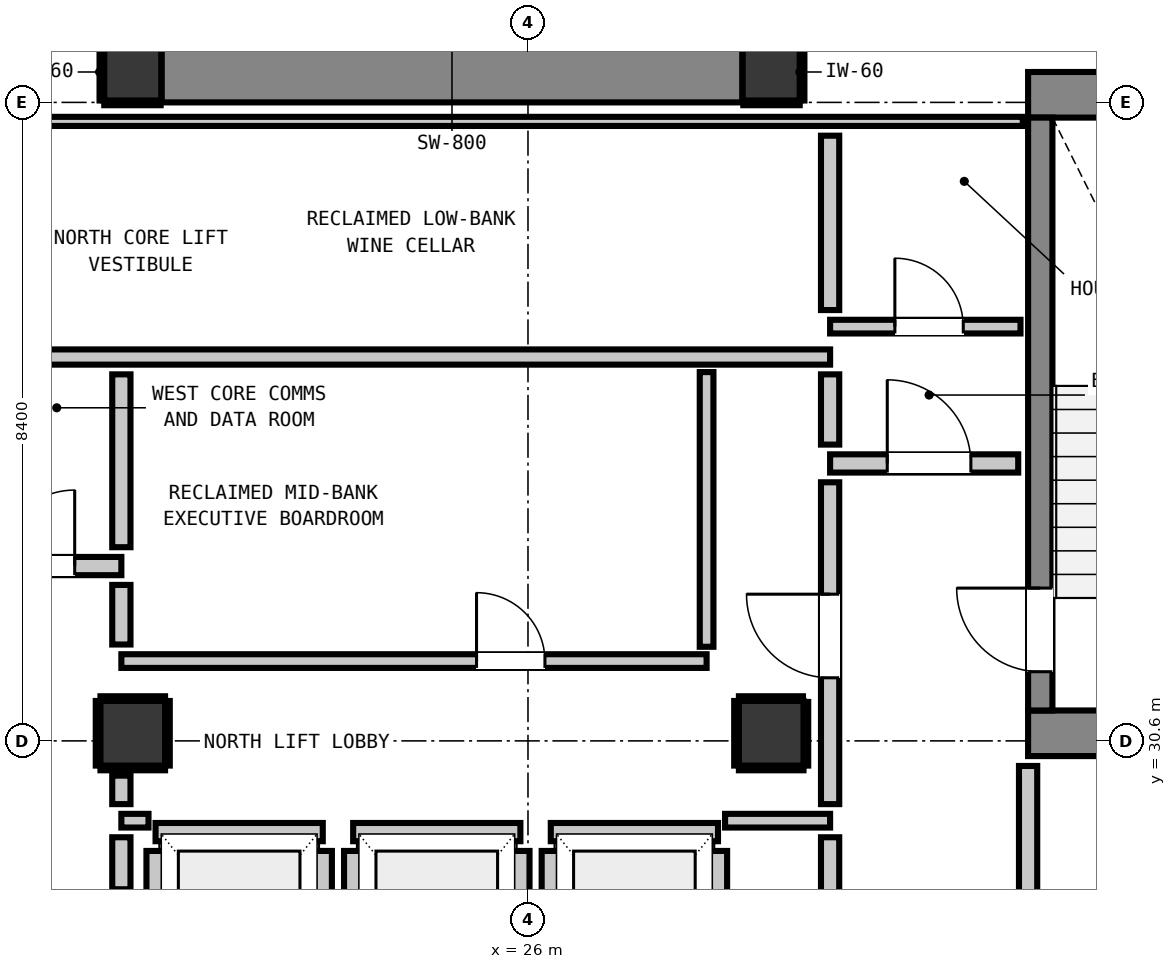
"""IFC4 building model, lengths in metres.
Left out: names, types, materials, properties, quantities, classifications, styles, units other than length and angle.
Written with IfcOpenShell. Run it as: python <this file> out.ifc"""

import sys

from ifc_helpers import new_model, si_unit, direction, frame, frame_2d, origin, origin_2d, place, context, subcontext, project, spatial, rectangle, extrude, element, fill, save


model = new_model("IFC4")
c1 = context("Model", 3, precision=1e-05, world=origin(), true_north=direction((0.0, 1.0)))
c2 = subcontext(c1, "Body", "Model", "MODEL_VIEW")
j1 = project(units=[si_unit("LENGTHUNIT", "METRE"), si_unit("PLANEANGLEUNIT", "RADIAN")], contexts=[c1])
p1 = place(None, origin())
s1 = spatial("IfcSite", under=j1, at=p1, CompositionType="ELEMENT")
p2 = place(p1, origin())
s2 = spatial("IfcBuilding", under=s1, at=p2, CompositionType="ELEMENT")
p3 = place(p2, frame((0.0, 0.0, 247.88)))
s3 = spatial("IfcBuildingStorey", under=s2, at=p3, CompositionType="ELEMENT", Elevation=247.88)
for number, where, z_axis, x_axis in (
    (1, (20.8, 39.4, 0.0), (0.0, 0.0, 1.0), (1.0, 0.0, 0.0)),
    (2, (29.2, 39.4, 0.0), (0.0, 0.0, 1.0), (1.0, 0.0, 0.0)),
):
    element("IfcColumn", number, at=place(p3, frame(where, z_axis=z_axis, x_axis=x_axis)), inside=s3, PredefinedType="COLUMN", context=c2, shape_type="SweptSolid", body=[
        extrude(rectangle(XDim=0.75, YDim=0.75, at=origin_2d()), origin(), (0.0, 0.0, 1.0), 3.32),
    ])
p4 = place(p3, frame((32.58, 39.1, 0.0), z_axis=(0.0, 0.0, 1.0), x_axis=(1.0, 0.0, 0.0)))
e3 = element("IfcWall", 3, at=p4, inside=s3, PredefinedType="SHEAR", context=c2, shape_type="SweptSolid", body=[
    extrude(rectangle(XDim=4.08, YDim=0.6, at=frame_2d((2.04, 0.0))), origin(), (0.0, 0.0, 1.0), 3.32),
])
p5 = place(p3, frame((32.58, 30.7, 0.0), z_axis=(0.0, 0.0, 1.0), x_axis=(1.0, 0.0, 0.0)))
e4 = element("IfcWall", 4, at=p5, inside=s3, PredefinedType="SHEAR", context=c2, shape_type="SweptSolid", body=[
    extrude(rectangle(XDim=3.54, YDim=0.6, at=frame_2d((1.77, 0.0))), origin(), (0.0, 0.0, 1.0), 3.32),
])
p6 = place(p3, frame((21.18, 39.4, 0.0), z_axis=(0.0, 0.0, 1.0), x_axis=(1.0, 0.0, 0.0)))
e5 = element("IfcWall", 5, at=p6, inside=s3, PredefinedType="SHEAR", context=c2, shape_type="SweptSolid", body=[
    extrude(rectangle(XDim=7.64, YDim=0.8, at=frame_2d((3.82, 0.0))), origin(), (0.0, 0.0, 1.0), 3.32),
])
p7 = place(p3, frame((32.74, 31.0, 0.0), z_axis=(0.0, 0.0, 1.0), x_axis=(0.0, 1.0, 0.0)))
e6 = element("IfcWall", 6, at=p7, inside=s3, PredefinedType="SHEAR", context=c2, shape_type="SweptSolid", body=[
    extrude(rectangle(XDim=7.8, YDim=0.32, at=frame_2d((3.9, 0.0))), origin(), (0.0, 0.0, 1.0), 3.32),
])
p8 = place(p7, frame((0.51, 0.0, 0.0)))
e7 = element("IfcOpeningElement", 7, at=p8, cuts=e6, PredefinedType="OPENING", context=c2, shape_type="SweptSolid", body=[
    extrude(rectangle(XDim=1.1, YDim=2.15, at=frame_2d((0.55, 1.075))), frame((0.0, 0.17, 0.0), z_axis=(0.0, -1.0, 0.0), x_axis=(1.0, 0.0, 0.0)), (0.0, 0.0, 1.0), 0.34),
])
for number, where, z_axis, x_axis in (
    (8, (20.8, 30.7, 0.0), (0.0, 0.0, 1.0), (1.0, 0.0, 0.0)),
    (9, (29.2, 30.7, 0.0), (0.0, 0.0, 1.0), (1.0, 0.0, 0.0)),
):
    element("IfcColumn", number, at=place(p3, frame(where, z_axis=z_axis, x_axis=x_axis)), inside=s3, PredefinedType="COLUMN", context=c2, shape_type="SweptSolid", body=[
        extrude(rectangle(XDim=0.85, YDim=0.85, at=origin_2d()), origin(), (0.0, 0.0, 1.0), 3.32),
    ])
p9 = place(p3, frame((21.1, 29.4, 0.0), z_axis=(0.0, 0.0, 1.0), x_axis=(1.0, 0.0, 0.0)))
e10 = element("IfcWall", 10, at=p9, inside=s3, PredefinedType="PARTITIONING", context=c2, shape_type="SweptSolid", body=[
    extrude(rectangle(XDim=2.2, YDim=0.24, at=frame_2d((1.1, 0.0))), origin(), (0.0, 0.0, 1.0), 2.9),
])
p10 = place(p3, frame((21.1, 27.048, 0.0), z_axis=(0.0, 0.0, 1.0), x_axis=(0.0, 1.0, 0.0)))
e11 = element("IfcWall", 11, at=p10, inside=s3, PredefinedType="PARTITIONING", context=c2, shape_type="SweptSolid", body=[
    extrude(rectangle(XDim=2.104, YDim=0.24, at=frame_2d((1.052, 0.0))), origin(), (0.0, 0.0, 1.0), 0.905),
])
p11 = place(p3, frame((23.3, 27.048, 0.0), z_axis=(0.0, 0.0, 1.0), x_axis=(0.0, 1.0, 0.0)))
e12 = element("IfcWall", 12, at=p11, inside=s3, PredefinedType="PARTITIONING", context=c2, shape_type="SweptSolid", body=[
    extrude(rectangle(XDim=2.104, YDim=0.24, at=frame_2d((1.052, 0.0))), origin(), (0.0, 0.0, 1.0), 2.9),
])
p12 = place(p3, frame((23.7, 29.4, 0.0), z_axis=(0.0, 0.0, 1.0), x_axis=(1.0, 0.0, 0.0)))
e13 = element("IfcWall", 13, at=p12, inside=s3, PredefinedType="PARTITIONING", context=c2, shape_type="SweptSolid", body=[
    extrude(rectangle(XDim=2.2, YDim=0.24, at=frame_2d((1.1, 0.0))), origin(), (0.0, 0.0, 1.0), 2.9),
])
for number, where, z_axis, x_axis in (
    (14, (23.7, 27.048, 0.0), (0.0, 0.0, 1.0), (0.0, 1.0, 0.0)),
    (15, (25.9, 27.048, 0.0), (0.0, 0.0, 1.0), (0.0, 1.0, 0.0)),
):
    element("IfcWall", number, at=place(p3, frame(where, z_axis=z_axis, x_axis=x_axis)), inside=s3, PredefinedType="PARTITIONING", context=c2, shape_type="SweptSolid", body=[
        extrude(rectangle(XDim=2.104, YDim=0.24, at=frame_2d((1.052, 0.0))), origin(), (0.0, 0.0, 1.0), 2.9),
    ])
p13 = place(p3, frame((26.3, 29.4, 0.0), z_axis=(0.0, 0.0, 1.0), x_axis=(1.0, 0.0, 0.0)))
e16 = element("IfcWall", 16, at=p13, inside=s3, PredefinedType="PARTITIONING", context=c2, shape_type="SweptSolid", body=[
    extrude(rectangle(XDim=2.2, YDim=0.24, at=frame_2d((1.1, 0.0))), origin(), (0.0, 0.0, 1.0), 2.9),
])
p14 = place(p3, frame((26.3, 27.048, 0.0), z_axis=(0.0, 0.0, 1.0), x_axis=(0.0, 1.0, 0.0)))
e17 = element("IfcWall", 17, at=p14, inside=s3, PredefinedType="PARTITIONING", context=c2, shape_type="SweptSolid", body=[
    extrude(rectangle(XDim=2.104, YDim=0.24, at=frame_2d((1.052, 0.0))), origin(), (0.0, 0.0, 1.0), 2.9),
])
p15 = place(p3, frame((28.5, 27.33, 0.0), z_axis=(0.0, 0.0, 1.0), x_axis=(0.0, 1.0, 0.0)))
e18 = element("IfcWall", 18, at=p15, inside=s3, PredefinedType="PARTITIONING", context=c2, shape_type="SweptSolid", body=[
    extrude(rectangle(XDim=1.822, YDim=0.24, at=frame_2d((0.911, 0.0))), origin(), (0.0, 0.0, 1.0), 0.905),
])
p16 = place(p3, frame((17.45, 32.9, 0.0), z_axis=(0.0, 0.0, 1.0), x_axis=(1.0, 0.0, 0.0)))
e19 = element("IfcWall", 19, at=p16, inside=s3, PredefinedType="PARTITIONING", context=c2, shape_type="SweptSolid", body=[
    extrude(rectangle(XDim=3.2, YDim=0.24, at=frame_2d((1.6, 0.0))), origin(), (0.0, 0.0, 1.0), 2.9),
])
p17 = place(p16, frame((0.159, 0.0, 0.0)))
e20 = element("IfcOpeningElement", 20, at=p17, cuts=e19, PredefinedType="OPENING", context=c2, shape_type="SweptSolid", body=[
    extrude(rectangle(XDim=1.1, YDim=2.15, at=frame_2d((0.55, 1.075))), frame((0.0, 0.13, 0.0), z_axis=(0.0, -1.0, 0.0), x_axis=(1.0, 0.0, 0.0)), (0.0, 0.0, 1.0), 0.26),
])
p18 = place(p16, frame((1.586, 0.0, 0.0)))
e21 = element("IfcOpeningElement", 21, at=p18, cuts=e19, PredefinedType="OPENING", context=c2, shape_type="SweptSolid", body=[
    extrude(rectangle(XDim=1.0, YDim=2.15, at=frame_2d((0.5, 1.075))), frame((0.0, 0.13, 0.0), z_axis=(0.0, -1.0, 0.0), x_axis=(1.0, 0.0, 0.0)), (0.0, 0.0, 1.0), 0.26),
])
p19 = place(p3, frame((29.975, 34.25, 0.0), z_axis=(0.0, 0.0, 1.0), x_axis=(1.0, 0.0, 0.0)))
e22 = element("IfcWall", 22, at=p19, inside=s3, PredefinedType="PARTITIONING", context=c2, shape_type="SweptSolid", body=[
    extrude(rectangle(XDim=2.475, YDim=0.24, at=frame_2d((1.237, 0.0))), origin(), (0.0, 0.0, 1.0), 2.9),
])
p20 = place(p19, frame((0.752, 0.0, 0.0)))
e23 = element("IfcOpeningElement", 23, at=p20, cuts=e22, PredefinedType="OPENING", context=c2, shape_type="SweptSolid", body=[
    extrude(rectangle(XDim=1.1, YDim=2.15, at=frame_2d((0.55, 1.075))), frame((0.0, 0.13, 0.0), z_axis=(0.0, -1.0, 0.0), x_axis=(1.0, 0.0, 0.0)), (0.0, 0.0, 1.0), 0.26),
])
p21 = place(p3, frame((18.95, 35.65, 0.0), z_axis=(0.0, 0.0, 1.0), x_axis=(1.0, 0.0, 0.0)))
e24 = element("IfcWall", 24, at=p21, inside=s3, PredefinedType="PARTITIONING", context=c2, shape_type="SweptSolid", body=[
    extrude(rectangle(XDim=11.025, YDim=0.2, at=frame_2d((5.513, 0.0))), origin(), (0.0, 0.0, 1.0), 2.9),
])
p22 = place(p3, frame((20.65, 29.55, 0.0), z_axis=(0.0, 0.0, 1.0), x_axis=(1.0, 0.0, 0.0)))
e25 = element("IfcWall", 25, at=p22, inside=s3, PredefinedType="PARTITIONING", context=c2, shape_type="SweptSolid", body=[
    extrude(rectangle(XDim=0.357, YDim=0.18, at=frame_2d((0.179, 0.0))), origin(), (0.0, 0.0, 1.0), 2.9),
])
p23 = place(p3, frame((28.593, 29.55, 0.0), z_axis=(0.0, 0.0, 1.0), x_axis=(1.0, 0.0, 0.0)))
e26 = element("IfcWall", 26, at=p23, inside=s3, PredefinedType="PARTITIONING", context=c2, shape_type="SweptSolid", body=[
    extrude(rectangle(XDim=1.382, YDim=0.18, at=frame_2d((0.691, 0.0))), origin(), (0.0, 0.0, 1.0), 2.9),
])
p24 = place(p3, frame((20.65, 31.65, 0.0), z_axis=(0.0, 0.0, 1.0), x_axis=(1.0, 0.0, 0.0)))
e27 = element("IfcWall", 27, at=p24, inside=s3, PredefinedType="PARTITIONING", context=c2, shape_type="SweptSolid", body=[
    extrude(rectangle(XDim=7.7, YDim=0.18, at=frame_2d((3.85, 0.0))), origin(), (0.0, 0.0, 1.0), 2.9),
])
p25 = place(p24, frame((4.673, 0.0, 0.0)))
e28 = element("IfcOpeningElement", 28, at=p25, cuts=e27, PredefinedType="OPENING", context=c2, shape_type="SweptSolid", body=[
    extrude(rectangle(XDim=0.9, YDim=2.1, at=frame_2d((0.45, 1.05))), frame((0.0, 0.1, 0.0), z_axis=(0.0, -1.0, 0.0), x_axis=(1.0, 0.0, 0.0)), (0.0, 0.0, 1.0), 0.2),
])
p26 = place(p3, frame((29.975, 36.05, 0.0), z_axis=(0.0, 0.0, 1.0), x_axis=(1.0, 0.0, 0.0)))
e29 = element("IfcWall", 29, at=p26, inside=s3, PredefinedType="PARTITIONING", context=c2, shape_type="SweptSolid", body=[
    extrude(rectangle(XDim=2.505, YDim=0.18, at=frame_2d((1.252, 0.0))), origin(), (0.0, 0.0, 1.0), 2.9),
])
p27 = place(p26, frame((0.852, 0.0, 0.0)))
e30 = element("IfcOpeningElement", 30, at=p27, cuts=e29, PredefinedType="OPENING", context=c2, shape_type="SweptSolid", body=[
    extrude(rectangle(XDim=0.9, YDim=2.1, at=frame_2d((0.45, 1.05))), frame((0.0, 0.1, 0.0), z_axis=(0.0, -1.0, 0.0), x_axis=(1.0, 0.0, 0.0)), (0.0, 0.0, 1.0), 0.2),
])
p28 = place(p3, frame((18.95, 38.75, 0.0), z_axis=(0.0, 0.0, 1.0), x_axis=(1.0, 0.0, 0.0)))
e31 = element("IfcWall", 31, at=p28, inside=s3, PredefinedType="PARTITIONING", context=c2, shape_type="SweptSolid", body=[
    extrude(rectangle(XDim=13.56, YDim=0.12, at=frame_2d((6.78, 0.0))), origin(), (0.0, 0.0, 1.0), 0.905),
])
p29 = place(p3, frame((20.65, 28.648, 0.0), z_axis=(0.0, 0.0, 1.0), x_axis=(0.0, 1.0, 0.0)))
e32 = element("IfcWall", 32, at=p29, inside=s3, PredefinedType="PARTITIONING", context=c2, shape_type="SweptSolid", body=[
    extrude(rectangle(XDim=0.684, YDim=0.24, at=frame_2d((0.342, 0.0))), origin(), (0.0, 0.0, 1.0), 0.905),
])
p30 = place(p3, frame((20.65, 29.768, 0.0), z_axis=(0.0, 0.0, 1.0), x_axis=(0.0, 1.0, 0.0)))
e33 = element("IfcWall", 33, at=p30, inside=s3, PredefinedType="PARTITIONING", context=c2, shape_type="SweptSolid", body=[
    extrude(rectangle(XDim=0.375, YDim=0.24, at=frame_2d((0.188, 0.0))), origin(), (0.0, 0.0, 1.0), 0.905),
])
p31 = place(p3, frame((20.65, 31.868, 0.0), z_axis=(0.0, 0.0, 1.0), x_axis=(0.0, 1.0, 0.0)))
e34 = element("IfcWall", 34, at=p31, inside=s3, PredefinedType="PARTITIONING", context=c2, shape_type="SweptSolid", body=[
    extrude(rectangle(XDim=0.784, YDim=0.24, at=frame_2d((0.392, 0.0))), origin(), (0.0, 0.0, 1.0), 0.905),
])
p32 = place(p3, frame((20.65, 33.148, 0.0), z_axis=(0.0, 0.0, 1.0), x_axis=(0.0, 1.0, 0.0)))
e35 = element("IfcWall", 35, at=p32, inside=s3, PredefinedType="PARTITIONING", context=c2, shape_type="SweptSolid", body=[
    extrude(rectangle(XDim=2.274, YDim=0.24, at=frame_2d((1.137, 0.0))), origin(), (0.0, 0.0, 1.0), 0.905),
])
p33 = place(p3, frame((29.975, 25.648, 0.0), z_axis=(0.0, 0.0, 1.0), x_axis=(0.0, 1.0, 0.0)))
e36 = element("IfcWall", 36, at=p33, inside=s3, PredefinedType="PARTITIONING", context=c2, shape_type="SweptSolid", body=[
    extrude(rectangle(XDim=3.684, YDim=0.24, at=frame_2d((1.842, 0.0))), origin(), (0.0, 0.0, 1.0), 2.9),
])
p34 = place(p3, frame((29.975, 29.768, 0.0), z_axis=(0.0, 0.0, 1.0), x_axis=(0.0, 1.0, 0.0)))
e37 = element("IfcWall", 37, at=p34, inside=s3, PredefinedType="PARTITIONING", context=c2, shape_type="SweptSolid", body=[
    extrude(rectangle(XDim=4.234, YDim=0.24, at=frame_2d((2.117, 0.0))), origin(), (0.0, 0.0, 1.0), 2.9),
])
p35 = place(p34, frame((1.662, 0.0, 0.0)))
e38 = element("IfcOpeningElement", 38, at=p35, cuts=e37, PredefinedType="OPENING", context=c2, shape_type="SweptSolid", body=[
    extrude(rectangle(XDim=1.1, YDim=2.15, at=frame_2d((0.55, 1.075))), frame((0.0, 0.13, 0.0), z_axis=(0.0, -1.0, 0.0), x_axis=(1.0, 0.0, 0.0)), (0.0, 0.0, 1.0), 0.26),
])
p36 = place(p3, frame((29.975, 34.498, 0.0), z_axis=(0.0, 0.0, 1.0), x_axis=(0.0, 1.0, 0.0)))
e39 = element("IfcWall", 39, at=p36, inside=s3, PredefinedType="PARTITIONING", context=c2, shape_type="SweptSolid", body=[
    extrude(rectangle(XDim=0.924, YDim=0.24, at=frame_2d((0.462, 0.0))), origin(), (0.0, 0.0, 1.0), 2.9),
])
p37 = place(p3, frame((29.975, 36.268, 0.0), z_axis=(0.0, 0.0, 1.0), x_axis=(0.0, 1.0, 0.0)))
e40 = element("IfcWall", 40, at=p37, inside=s3, PredefinedType="PARTITIONING", context=c2, shape_type="SweptSolid", body=[
    extrude(rectangle(XDim=2.294, YDim=0.24, at=frame_2d((1.147, 0.0))), origin(), (0.0, 0.0, 1.0), 2.9),
])
p38 = place(p3, frame((32.58, 25.648, 0.0), z_axis=(0.0, 0.0, 1.0), x_axis=(0.0, 1.0, 0.0)))
e41 = element("IfcWall", 41, at=p38, inside=s3, PredefinedType="PARTITIONING", context=c2, shape_type="SweptSolid", body=[
    extrude(rectangle(XDim=4.622, YDim=0.24, at=frame_2d((2.311, 0.0))), origin(), (0.0, 0.0, 1.0), 2.9),
])
p39 = place(p3, frame((28.35, 31.838, 0.0), z_axis=(0.0, 0.0, 1.0), x_axis=(0.0, 1.0, 0.0)))
e42 = element("IfcWall", 42, at=p39, inside=s3, PredefinedType="PARTITIONING", context=c2, shape_type="SweptSolid", body=[
    extrude(rectangle(XDim=3.614, YDim=0.18, at=frame_2d((1.807, 0.0))), origin(), (0.0, 0.0, 1.0), 2.9),
])
p40 = place(p3, frame((20.425, 38.993, 0.0), z_axis=(0.0, 0.0, 1.0), x_axis=(1.0, 0.0, 0.0)))
e43 = element("IfcWall", 43, at=p40, inside=s3, PredefinedType="PARTITIONING", context=c2, shape_type="SweptSolid", body=[
    extrude(rectangle(XDim=0.742, YDim=0.06, at=frame_2d((0.371, 0.0))), origin(), (0.0, 0.0, 1.0), 0.905),
])
p41 = place(p3, frame((20.393, 39.025, 0.0), z_axis=(0.0, 0.0, 1.0), x_axis=(0.0, 1.0, 0.0)))
e44 = element("IfcWall", 44, at=p41, inside=s3, PredefinedType="PARTITIONING", context=c2, shape_type="SweptSolid", body=[
    extrude(rectangle(XDim=0.75, YDim=0.06, at=frame_2d((0.375, 0.0))), origin(), (0.0, 0.0, 1.0), 0.905),
])
p42 = place(p3, frame((28.833, 38.993, 0.0), z_axis=(0.0, 0.0, 1.0), x_axis=(1.0, 0.0, 0.0)))
e45 = element("IfcWall", 45, at=p42, inside=s3, PredefinedType="PARTITIONING", context=c2, shape_type="SweptSolid", body=[
    extrude(rectangle(XDim=0.742, YDim=0.06, at=frame_2d((0.371, 0.0))), origin(), (0.0, 0.0, 1.0), 0.905),
])
p43 = place(p3, frame((29.607, 39.025, 0.0), z_axis=(0.0, 0.0, 1.0), x_axis=(0.0, 1.0, 0.0)))
e46 = element("IfcWall", 46, at=p43, inside=s3, PredefinedType="PARTITIONING", context=c2, shape_type="SweptSolid", body=[
    extrude(rectangle(XDim=0.75, YDim=0.06, at=frame_2d((0.375, 0.0))), origin(), (0.0, 0.0, 1.0), 0.905),
])
for number, where, z_axis, x_axis in (
    (47, (20.375, 30.243, 0.0), (0.0, 0.0, 1.0), (1.0, 0.0, 0.0)),
    (48, (20.375, 31.157, 0.0), (0.0, 0.0, 1.0), (1.0, 0.0, 0.0)),
    (49, (20.343, 30.275, 0.0), (0.0, 0.0, 1.0), (0.0, 1.0, 0.0)),
    (50, (21.257, 30.275, 0.0), (0.0, 0.0, 1.0), (0.0, 1.0, 0.0)),
    (51, (28.775, 30.243, 0.0), (0.0, 0.0, 1.0), (1.0, 0.0, 0.0)),
):
    element("IfcWall", number, at=place(p3, frame(where, z_axis=z_axis, x_axis=x_axis)), inside=s3, PredefinedType="PARTITIONING", context=c2, shape_type="SweptSolid", body=[
        extrude(rectangle(XDim=0.85, YDim=0.06, at=frame_2d((0.425, 0.0))), origin(), (0.0, 0.0, 1.0), 0.905),
    ])
p44 = place(p3, frame((28.775, 31.157, 0.0), z_axis=(0.0, 0.0, 1.0), x_axis=(1.0, 0.0, 0.0)))
e52 = element("IfcWall", 52, at=p44, inside=s3, PredefinedType="PARTITIONING", context=c2, shape_type="SweptSolid", body=[
    extrude(rectangle(XDim=0.843, YDim=0.06, at=frame_2d((0.421, 0.0))), origin(), (0.0, 0.0, 1.0), 0.905),
])
p45 = place(p3, frame((28.743, 30.275, 0.0), z_axis=(0.0, 0.0, 1.0), x_axis=(0.0, 1.0, 0.0)))
e53 = element("IfcWall", 53, at=p45, inside=s3, PredefinedType="PARTITIONING", context=c2, shape_type="SweptSolid", body=[
    extrude(rectangle(XDim=0.85, YDim=0.06, at=frame_2d((0.425, 0.0))), origin(), (0.0, 0.0, 1.0), 0.905),
])
p46 = place(p3, frame((29.657, 30.275, 0.0), z_axis=(0.0, 0.0, 1.0), x_axis=(0.0, 1.0, 0.0)))
e54 = element("IfcWall", 54, at=p46, inside=s3, PredefinedType="PARTITIONING", context=c2, shape_type="SweptSolid", body=[
    extrude(rectangle(XDim=0.837, YDim=0.06, at=frame_2d((0.418, 0.0))), origin(), (0.0, 0.0, 1.0), 0.905),
])
p47 = place(p8, origin())
e55 = element("IfcDoor", 55, at=p47, inside=s3, OperationType="SINGLE_SWING_RIGHT", PredefinedType="DOOR", context=c2, shape_type="SweptSolid", body=[
    extrude(rectangle(XDim=1.1, YDim=2.15, at=frame_2d((0.55, 1.075))), frame((0.0, 0.025, 0.0), z_axis=(0.0, -1.0, 0.0), x_axis=(1.0, 0.0, 0.0)), (0.0, 0.0, 1.0), 0.05),
])
fill(e7, e55)
p48 = place(p35, origin())
e56 = element("IfcDoor", 56, at=p48, inside=s3, OperationType="SINGLE_SWING_RIGHT", PredefinedType="DOOR", context=c2, shape_type="SweptSolid", body=[
    extrude(rectangle(XDim=1.1, YDim=2.15, at=frame_2d((0.55, 1.075))), frame((0.0, 0.025, 0.0), z_axis=(0.0, -1.0, 0.0), x_axis=(1.0, 0.0, 0.0)), (0.0, 0.0, 1.0), 0.05),
])
fill(e38, e56)
p49 = place(p20, origin())
e57 = element("IfcDoor", 57, at=p49, inside=s3, OperationType="SINGLE_SWING_LEFT", PredefinedType="DOOR", context=c2, shape_type="SweptSolid", body=[
    extrude(rectangle(XDim=1.1, YDim=2.15, at=frame_2d((0.55, 1.075))), frame((0.0, 0.025, 0.0), z_axis=(0.0, -1.0, 0.0), x_axis=(1.0, 0.0, 0.0)), (0.0, 0.0, 1.0), 0.05),
])
fill(e23, e57)
p50 = place(p18, origin())
e58 = element("IfcDoor", 58, at=p50, inside=s3, OperationType="SINGLE_SWING_RIGHT", PredefinedType="DOOR", context=c2, shape_type="SweptSolid", body=[
    extrude(rectangle(XDim=1.0, YDim=2.15, at=frame_2d((0.5, 1.075))), frame((0.0, 0.025, 0.0), z_axis=(0.0, -1.0, 0.0), x_axis=(1.0, 0.0, 0.0)), (0.0, 0.0, 1.0), 0.05),
])
fill(e21, e58)
p51 = place(p27, origin())
e59 = element("IfcDoor", 59, at=p51, inside=s3, OperationType="SINGLE_SWING_LEFT", PredefinedType="DOOR", context=c2, shape_type="SweptSolid", body=[
    extrude(rectangle(XDim=0.9, YDim=2.1, at=frame_2d((0.45, 1.05))), frame((0.0, 0.025, 0.0), z_axis=(0.0, -1.0, 0.0), x_axis=(1.0, 0.0, 0.0)), (0.0, 0.0, 1.0), 0.05),
])
fill(e30, e59)
p52 = place(p25, origin())
e60 = element("IfcDoor", 60, at=p52, inside=s3, OperationType="SINGLE_SWING_LEFT", PredefinedType="DOOR", context=c2, shape_type="SweptSolid", body=[
    extrude(rectangle(XDim=0.9, YDim=2.1, at=frame_2d((0.45, 1.05))), frame((0.0, 0.025, 0.0), z_axis=(0.0, -1.0, 0.0), x_axis=(1.0, 0.0, 0.0)), (0.0, 0.0, 1.0), 0.05),
])
fill(e28, e60)
save(model, sys.argv[1])
